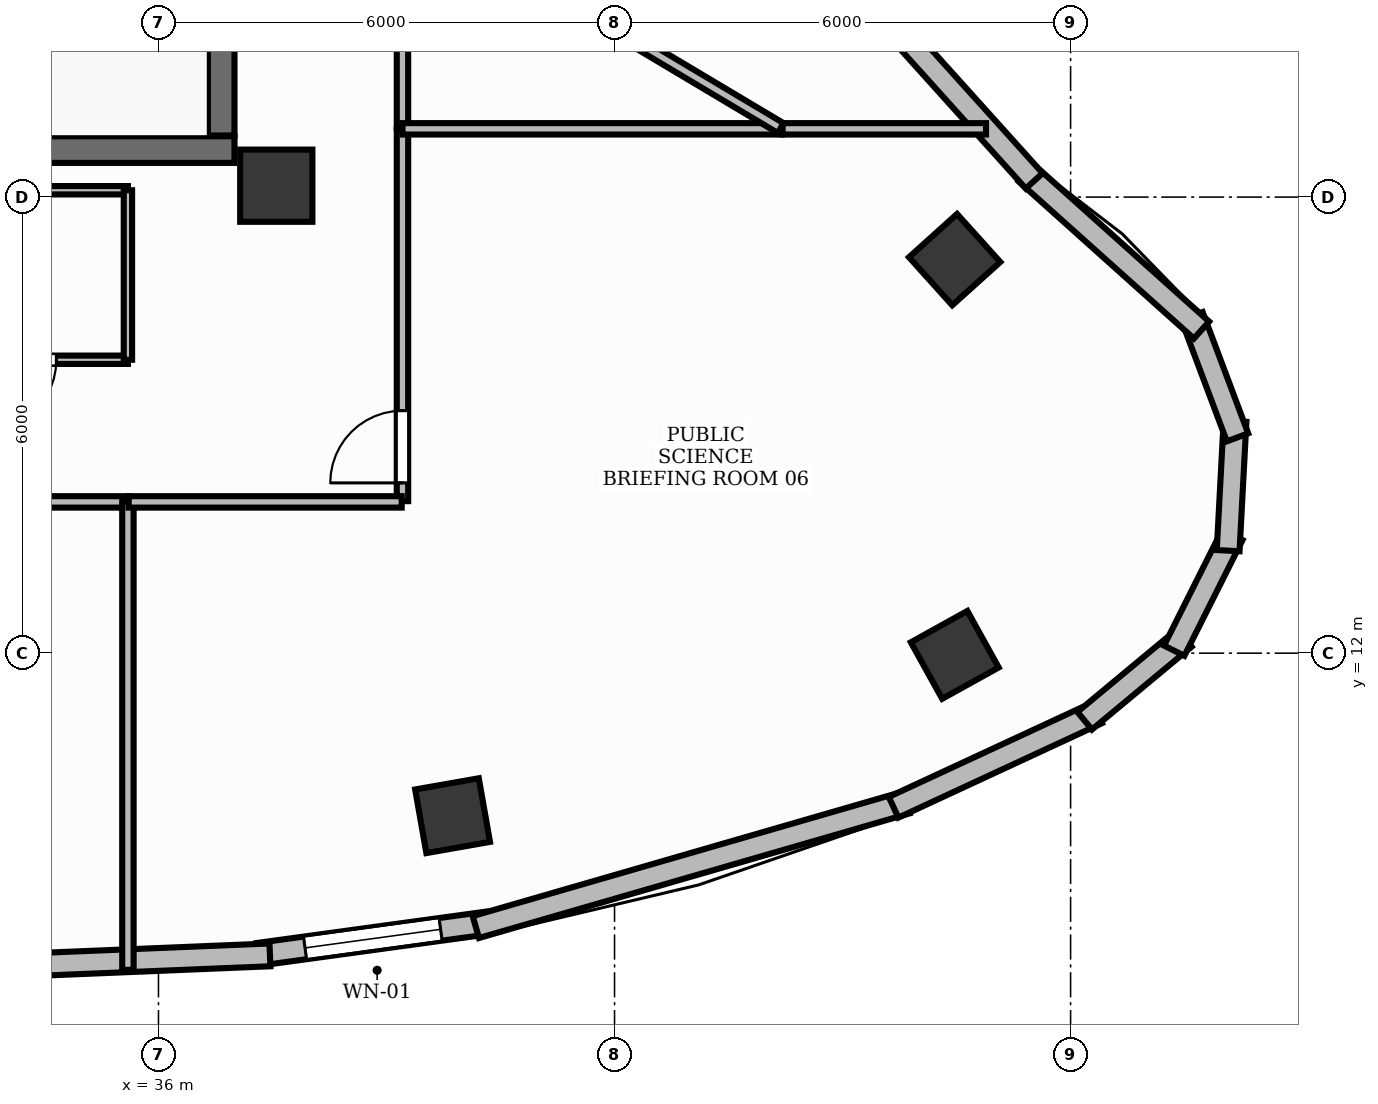
"""IFC4 building model, lengths in metres.
Left out: names, types, materials, properties, quantities, classifications, styles, units other than length and angle.
Written with IfcOpenShell. Run it as: python <this file> out.ifc"""

import sys

from ifc_helpers import new_model, si_unit, direction, frame, frame_2d, origin, origin_2d, place, context, subcontext, project, spatial, rectangle, extrude, element, fill, save


model = new_model("IFC4")
c1 = context("Model", 3, precision=1e-05, world=origin(), true_north=direction((0.0, 1.0)))
c2 = subcontext(c1, "Body", "Model", "MODEL_VIEW")
j1 = project(units=[si_unit("LENGTHUNIT", "METRE"), si_unit("PLANEANGLEUNIT", "RADIAN")], contexts=[c1])
p1 = place(None, origin())
s1 = spatial("IfcSite", under=j1, at=p1, CompositionType="ELEMENT")
p2 = place(p1, origin())
s2 = spatial("IfcBuilding", under=s1, at=p2, CompositionType="ELEMENT")
p3 = place(p2, frame((0.0, 0.0, 291.0)))
s3 = spatial("IfcBuildingStorey", under=s2, at=p3, CompositionType="ELEMENT", Elevation=291.0)
p4 = place(p3, frame((28.852, 18.625, 0.0), z_axis=(0.0, 0.0, 1.0), x_axis=(1.0, 0.0, 0.0)))
e1 = element("IfcWall", 1, at=p4, inside=s3, PredefinedType="SHEAR", context=c2, shape_type="SweptSolid", body=[
    extrude(rectangle(XDim=8.148, YDim=0.35, at=frame_2d((4.074, 0.0))), origin(), (0.0, 0.0, 1.0), 6.3),
])
p5 = place(p3, frame((36.825, 18.81, 0.0), z_axis=(0.0, 0.0, 1.0), x_axis=(0.0, 1.0, 0.0)))
e2 = element("IfcWall", 2, at=p5, inside=s3, PredefinedType="SHEAR", context=c2, shape_type="SweptSolid", body=[
    extrude(rectangle(XDim=3.08, YDim=0.35, at=frame_2d((1.54, 0.0))), origin(), (0.0, 0.0, 1.0), 6.3),
])
p6 = place(p3, frame((37.55, 18.15, -0.0), z_axis=(0.0, 0.0, 1.0), x_axis=(1.0, 0.0, 0.0)))
e3 = element("IfcColumn", 3, at=p6, inside=s3, PredefinedType="PILASTER", context=c2, shape_type="SweptSolid", body=[
    extrude(rectangle(XDim=0.95, YDim=0.95, at=origin_2d()), origin(), (0.0, 0.0, 1.0), 6.301),
])
for number, where, z_axis, x_axis in (
    (4, (39.869, 9.862, -0.0), (0.0, 0.0, 1.0), (0.985, 0.173, 0.0)),
    (5, (46.476, 11.977, -0.0), (0.0, 0.0, 1.0), (0.875, 0.485, 0.0)),
    (6, (46.475, 17.177, -0.0), (0.0, 0.0, 1.0), (-0.669, 0.743, 0.0)),
):
    element("IfcColumn", number, at=place(p3, frame(where, z_axis=z_axis, x_axis=x_axis)), inside=s3, PredefinedType="COLUMN", context=c2, shape_type="SweptSolid", body=[
        extrude(rectangle(XDim=0.85, YDim=0.85, at=origin_2d()), origin(), (0.0, 0.0, 1.0), 6.301),
    ])
p7 = place(p3, frame((37.311, 8.038, 0.0), z_axis=(0.0, 0.0, 1.0), x_axis=(0.990747543086, 0.135717743381, 0.0)))
e7 = element("IfcWall", 7, at=p7, inside=s3, PredefinedType="STANDARD", context=c2, shape_type="SweptSolid", body=[
    extrude(rectangle(XDim=3.045, YDim=0.3, at=frame_2d((1.523, 0.0))), origin(), (0.0, 0.0, 1.0), 6.3),
])
p8 = place(p7, frame((0.623, 0.0, 0.9)))
e8 = element("IfcOpeningElement", 8, at=p8, cuts=e7, PredefinedType="OPENING", context=c2, shape_type="SweptSolid", body=[
    extrude(rectangle(XDim=1.8, YDim=2.1, at=frame_2d((0.9, 1.05))), frame((0.0, 0.165, 0.0), z_axis=(0.0, -1.0, 0.0), x_axis=(1.0, 0.0, 0.0)), (0.0, 0.0, 1.0), 0.33),
])
p9 = place(p3, frame((34.368, 7.903, 0.0), z_axis=(0.0, 0.0, 1.0), x_axis=(0.999155038247, 0.041099994481, 0.0)))
e9 = element("IfcWall", 9, at=p9, inside=s3, PredefinedType="STANDARD", context=c2, shape_type="SweptSolid", body=[
    extrude(rectangle(XDim=3.101, YDim=0.3, at=frame_2d((1.55, 0.0))), origin(), (0.0, 0.0, 1.0), 6.3),
])
p10 = place(p3, frame((40.175, 8.397, 0.0), z_axis=(0.0, 0.0, 1.0), x_axis=(0.960603242608, 0.277923389247, 0.0)))
e10 = element("IfcWall", 10, at=p10, inside=s3, PredefinedType="STANDARD", context=c2, shape_type="SweptSolid", body=[
    extrude(rectangle(XDim=5.898, YDim=0.3, at=frame_2d((2.949, 0.0))), origin(), (0.0, 0.0, 1.0), 6.3),
])
p11 = place(p3, frame((45.671, 9.973, 0.0), z_axis=(0.0, 0.0, 1.0), x_axis=(0.907185947811, 0.420729908722, 0.0)))
e11 = element("IfcWall", 11, at=p11, inside=s3, PredefinedType="STANDARD", context=c2, shape_type="SweptSolid", body=[
    extrude(rectangle(XDim=2.953, YDim=0.3, at=frame_2d((1.477, 0.0))), origin(), (0.0, 0.0, 1.0), 6.3),
])
for number, where, z_axis, x_axis in (
    (12, (48.185, 11.111, 0.0), (0.0, 0.0, 1.0), (0.769, 0.639, 0.0)),
    (13, (49.363, 12.032, 0.0), (0.0, 0.0, 1.0), (0.449, 0.894, 0.0)),
):
    element("IfcWall", number, at=place(p3, frame(where, z_axis=z_axis, x_axis=x_axis)), inside=s3, PredefinedType="STANDARD", context=c2, shape_type="SweptSolid", body=[
        extrude(rectangle(XDim=1.704, YDim=0.3, at=frame_2d((0.852, 0.0))), origin(), (0.0, 0.0, 1.0), 6.3),
    ])
for number, where, z_axis, x_axis in (
    (14, (50.073, 13.349, 0.0), (0.0, 0.0, 1.0), (0.053, 0.999, 0.0)),
    (15, (50.196, 14.839, 0.0), (0.0, 0.0, 1.0), (-0.351, 0.936, 0.0)),
):
    element("IfcWall", number, at=place(p3, frame(where, z_axis=z_axis, x_axis=x_axis)), inside=s3, PredefinedType="STANDARD", context=c2, shape_type="SweptSolid", body=[
        extrude(rectangle(XDim=1.704, YDim=0.3, at=frame_2d((0.852, 0.0))), origin(), (0.0, 0.0, 1.0), 6.3),
    ])
p12 = place(p3, frame((49.722, 16.251, 0.0), z_axis=(0.0, 0.0, 1.0), x_axis=(-0.744720921046, 0.667376018266, 0.0)))
e16 = element("IfcWall", 16, at=p12, inside=s3, PredefinedType="STANDARD", context=c2, shape_type="SweptSolid", body=[
    extrude(rectangle(XDim=3.094, YDim=0.3, at=frame_2d((1.547, 0.0))), origin(), (0.0, 0.0, 1.0), 6.3),
])
p13 = place(p3, frame((47.521, 18.213, 0.0), z_axis=(0.0, 0.0, 1.0), x_axis=(-0.669166006669, 0.743112949368, 0.0)))
e17 = element("IfcWall", 17, at=p13, inside=s3, PredefinedType="STANDARD", context=c2, shape_type="SweptSolid", body=[
    extrude(rectangle(XDim=2.948, YDim=0.3, at=frame_2d((1.474, 0.0))), origin(), (0.0, 0.0, 1.0), 6.3),
])
p14 = place(p3, frame((32.568, 13.99, 0.0), z_axis=(0.0, 0.0, 1.0), x_axis=(1.0, 0.0, 0.0)))
e18 = element("IfcWall", 18, at=p14, inside=s3, PredefinedType="PARTITIONING", context=c2, shape_type="SweptSolid", body=[
    extrude(rectangle(XDim=3.03, YDim=0.15, at=frame_2d((1.515, 0.0))), origin(), (0.0, 0.0, 1.0), 4.61),
])
p15 = place(p14, frame((0.24, 0.0, 0.0)))
e19 = element("IfcOpeningElement", 19, at=p15, cuts=e18, PredefinedType="OPENING", context=c2, shape_type="SweptSolid", body=[
    extrude(rectangle(XDim=0.95, YDim=2.15, at=frame_2d((0.475, 1.075))), frame((0.0, 0.09, 0.0), z_axis=(0.0, -1.0, 0.0), x_axis=(1.0, 0.0, 0.0)), (0.0, 0.0, 1.0), 0.18),
])
p16 = place(p3, frame((35.598, 15.86, 0.0), z_axis=(0.0, 0.0, 1.0), x_axis=(-1.0, 0.0, 0.0)))
e20 = element("IfcWall", 20, at=p16, inside=s3, PredefinedType="MOVABLE", context=c2, shape_type="SweptSolid", body=[
    extrude(rectangle(XDim=3.31, YDim=0.11, at=frame_2d((1.655, 0.0))), origin(), (0.0, 0.0, 1.0), 4.61),
])
p17 = place(p16, frame((0.941, 0.0, 0.0)))
e21 = element("IfcOpeningElement", 21, at=p17, cuts=e20, PredefinedType="OPENING", context=c2, shape_type="SweptSolid", body=[
    extrude(rectangle(XDim=0.95, YDim=2.15, at=frame_2d((0.475, 1.075))), frame((0.0, 0.07, 0.0), z_axis=(0.0, -1.0, 0.0), x_axis=(1.0, 0.0, 0.0)), (0.0, 0.0, 1.0), 0.14),
])
p18 = place(p3, frame((39.21, 14.0, 0.0), z_axis=(0.0, 0.0, 1.0), x_axis=(0.0, 1.0, 0.0)))
e22 = element("IfcWall", 22, at=p18, inside=s3, PredefinedType="PARTITIONING", context=c2, shape_type="SweptSolid", body=[
    extrude(rectangle(XDim=4.898, YDim=0.15, at=frame_2d((2.449, 0.0))), origin(), (0.0, 0.0, 1.0), 4.61),
])
p19 = place(p18, frame((0.24, 0.0, 0.0)))
e23 = element("IfcOpeningElement", 23, at=p19, cuts=e22, PredefinedType="OPENING", context=c2, shape_type="SweptSolid", body=[
    extrude(rectangle(XDim=0.95, YDim=2.15, at=frame_2d((0.475, 1.075))), frame((0.0, 0.09, 0.0), z_axis=(0.0, -1.0, 0.0), x_axis=(1.0, 0.0, 0.0)), (0.0, 0.0, 1.0), 0.18),
])
p20 = place(p3, frame((39.21, 18.908, 0.0), z_axis=(0.0, 0.0, 1.0), x_axis=(0.0, 1.0, 0.0)))
e24 = element("IfcWall", 24, at=p20, inside=s3, PredefinedType="PARTITIONING", context=c2, shape_type="SweptSolid", body=[
    extrude(rectangle(XDim=2.966, YDim=0.15, at=frame_2d((1.483, 0.0))), origin(), (0.0, 0.0, 1.0), 4.61),
])
p21 = place(p20, frame((1.348, 0.0, 0.0)))
e25 = element("IfcOpeningElement", 25, at=p21, cuts=e24, PredefinedType="OPENING", context=c2, shape_type="SweptSolid", body=[
    extrude(rectangle(XDim=0.95, YDim=2.15, at=frame_2d((0.475, 1.075))), frame((0.0, 0.09, 0.0), z_axis=(0.0, -1.0, 0.0), x_axis=(1.0, 0.0, 0.0)), (0.0, 0.0, 1.0), 0.18),
])
p22 = place(p3, frame((35.598, 13.99, 0.0), z_axis=(0.0, 0.0, 1.0), x_axis=(0.0, -1.0, 0.0)))
e26 = element("IfcWall", 26, at=p22, inside=s3, PredefinedType="PARTITIONING", context=c2, shape_type="SweptSolid", body=[
    extrude(rectangle(XDim=6.156, YDim=0.15, at=frame_2d((3.078, 0.0))), origin(), (0.0, 0.0, 1.0), 4.61),
])
p23 = place(p3, frame((31.955, 18.09, 0.0), z_axis=(0.0, 0.0, 1.0), x_axis=(1.0, 0.0, 0.0)))
e27 = element("IfcWall", 27, at=p23, inside=s3, PredefinedType="MOVABLE", context=c2, shape_type="SweptSolid", body=[
    extrude(rectangle(XDim=3.643, YDim=0.11, at=frame_2d((1.821, 0.0))), origin(), (0.0, 0.0, 1.0), 4.61),
])
p24 = place(p3, frame((35.598, 18.09, 0.0), z_axis=(0.0, 0.0, 1.0), x_axis=(0.0, -1.0, 0.0)))
e28 = element("IfcWall", 28, at=p24, inside=s3, PredefinedType="MOVABLE", context=c2, shape_type="SweptSolid", body=[
    extrude(rectangle(XDim=2.23, YDim=0.11, at=frame_2d((1.115, 0.0))), origin(), (0.0, 0.0, 1.0), 4.61),
])
p25 = place(p3, frame((44.211, 18.898, 0.0), z_axis=(0.0, 0.0, 1.0), x_axis=(1.0, 0.0, 0.0)))
e29 = element("IfcWall", 29, at=p25, inside=s3, PredefinedType="PARTITIONING", context=c2, shape_type="SweptSolid", body=[
    extrude(rectangle(XDim=2.677, YDim=0.15, at=frame_2d((1.338, 0.0))), origin(), (0.0, 0.0, 1.0), 4.61),
])
p26 = place(p3, frame((35.608, 13.99, 0.0), z_axis=(0.0, 0.0, 1.0), x_axis=(1.0, 0.0, 0.0)))
e30 = element("IfcWall", 30, at=p26, inside=s3, PredefinedType="PARTITIONING", context=c2, shape_type="SweptSolid", body=[
    extrude(rectangle(XDim=3.592, YDim=0.15, at=frame_2d((1.796, 0.0))), origin(), (0.0, 0.0, 1.0), 4.61),
])
p27 = place(p3, frame((39.21, 18.898, 0.0), z_axis=(0.0, 0.0, 1.0), x_axis=(1.0, 0.0, 0.0)))
e31 = element("IfcWall", 31, at=p27, inside=s3, PredefinedType="PARTITIONING", context=c2, shape_type="SweptSolid", body=[
    extrude(rectangle(XDim=4.993, YDim=0.15, at=frame_2d((2.496, 0.0))), origin(), (0.0, 0.0, 1.0), 4.61),
])
p28 = place(p3, frame((39.21, 21.874, 0.0), z_axis=(0.0, 0.0, 1.0), x_axis=(0.858961945301, -0.512039428682, 0.0)))
e32 = element("IfcWall", 32, at=p28, inside=s3, PredefinedType="PARTITIONING", context=c2, shape_type="SweptSolid", body=[
    extrude(rectangle(XDim=5.793, YDim=0.15, at=frame_2d((2.896, 0.0))), origin(), (0.0, 0.0, 1.0), 4.61),
])
p29 = place(p8, origin())
e33 = element("IfcWindow", 33, at=p29, inside=s3, PartitioningType="SINGLE_PANEL", PredefinedType="WINDOW", context=c2, shape_type="SweptSolid", body=[
    extrude(rectangle(XDim=1.8, YDim=2.1, at=frame_2d((0.9, 1.05))), frame((0.0, 0.03, 0.0), z_axis=(0.0, -1.0, 0.0), x_axis=(1.0, 0.0, 0.0)), (0.0, 0.0, 1.0), 0.06),
])
fill(e8, e33)
p30 = place(p17, origin())
e34 = element("IfcDoor", 34, at=p30, inside=s3, OperationType="SINGLE_SWING_RIGHT", PredefinedType="DOOR", context=c2, shape_type="SweptSolid", body=[
    extrude(rectangle(XDim=0.95, YDim=2.15, at=frame_2d((0.475, 1.075))), frame((0.0, 0.025, 0.0), z_axis=(0.0, -1.0, 0.0), x_axis=(1.0, 0.0, 0.0)), (0.0, 0.0, 1.0), 0.05),
])
fill(e21, e34)
p31 = place(p19, origin())
e35 = element("IfcDoor", 35, at=p31, inside=s3, OperationType="SINGLE_SWING_LEFT", PredefinedType="DOOR", context=c2, shape_type="SweptSolid", body=[
    extrude(rectangle(XDim=0.95, YDim=2.15, at=frame_2d((0.475, 1.075))), frame((0.0, 0.025, 0.0), z_axis=(0.0, -1.0, 0.0), x_axis=(1.0, 0.0, 0.0)), (0.0, 0.0, 1.0), 0.05),
])
fill(e23, e35)
save(model, sys.argv[1])
